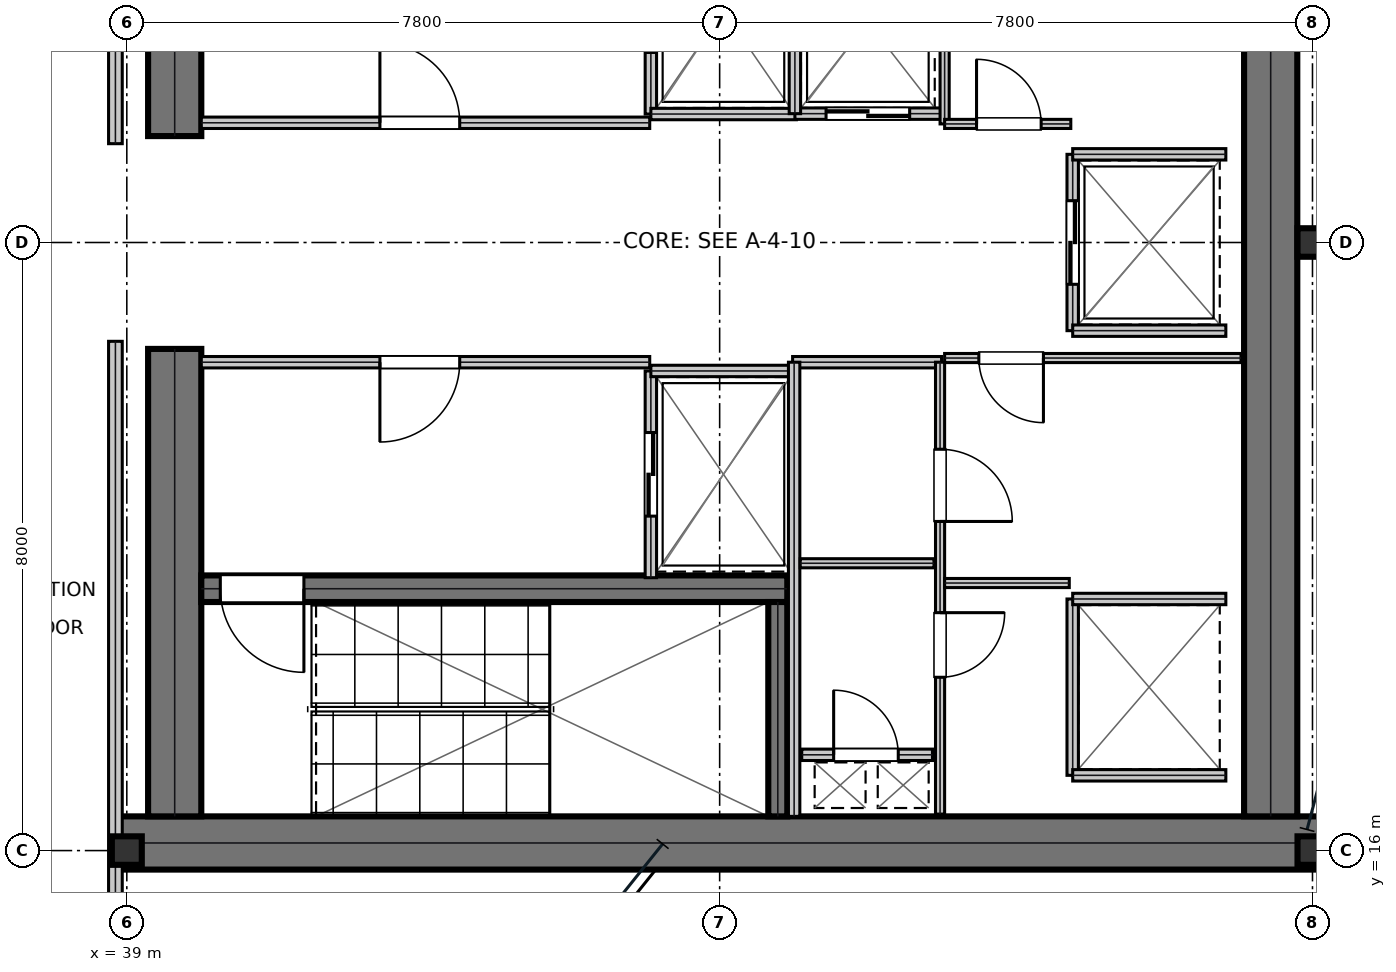
"""IFC4 building model, lengths in metres.
Left out: names, types, materials, properties, quantities, classifications, styles, units other than length and angle.
Written with IfcOpenShell. Run it as: python <this file> out.ifc"""

import sys

from ifc_helpers import new_model, si_unit, direction, frame, frame_2d, origin, origin_2d, place, context, subcontext, project, spatial, rectangle, i_section, extrude, element, fill, save


model = new_model("IFC4")
c1 = context("Model", 3, precision=1e-05, world=origin(), true_north=direction((0.0, 1.0)))
c2 = subcontext(c1, "Body", "Model", "MODEL_VIEW")
j1 = project(units=[si_unit("LENGTHUNIT", "METRE"), si_unit("PLANEANGLEUNIT", "RADIAN")], contexts=[c1])
p1 = place(None, origin())
s1 = spatial("IfcSite", under=j1, at=p1, CompositionType="ELEMENT")
p2 = place(p1, origin())
s2 = spatial("IfcBuilding", under=s1, at=p2, CompositionType="ELEMENT")
p3 = place(p2, frame((0.0, 0.0, 252.6)))
s3 = spatial("IfcBuildingStorey", under=s2, at=p3, CompositionType="ELEMENT", Elevation=252.6)
p4 = place(p3, frame((38.8, 16.1, 0.0), z_axis=(0.0, 0.0, 1.0), x_axis=(1.0, 0.0, 0.0)))
e1 = element("IfcWall", 1, at=p4, inside=s3, PredefinedType="SHEAR", context=c2, shape_type="SweptSolid", body=[
    extrude(rectangle(XDim=16.0, YDim=0.7, at=frame_2d((8.0, 0.0))), origin(), (0.0, 0.0, 1.0), 3.73),
])
for number, where, z_axis, x_axis in (
    (2, (39.63, 16.45, 0.0), (0.0, 0.0, 1.0), (0.0, 1.0, 0.0)),
    (3, (39.63, 25.4, 0.0), (0.0, 0.0, 1.0), (0.0, 1.0, 0.0)),
):
    element("IfcWall", number, at=place(p3, frame(where, z_axis=z_axis, x_axis=x_axis)), inside=s3, PredefinedType="SHEAR", context=c2, shape_type="SweptSolid", body=[
        extrude(rectangle(XDim=6.15, YDim=0.7, at=frame_2d((3.075, 0.0))), origin(), (0.0, 0.0, 1.0), 3.73),
    ])
p5 = place(p3, frame((54.05, 16.45, 0.0), z_axis=(0.0, 0.0, 1.0), x_axis=(0.0, 1.0, 0.0)))
e4 = element("IfcWall", 4, at=p5, inside=s3, PredefinedType="SHEAR", context=c2, shape_type="SweptSolid", body=[
    extrude(rectangle(XDim=15.1, YDim=0.7, at=frame_2d((7.55, 0.0))), origin(), (0.0, 0.0, 1.0), 3.73),
])
p6 = place(p3, frame((39.98, 19.445, 0.0), z_axis=(0.0, 0.0, 1.0), x_axis=(1.0, 0.0, 0.0)))
e5 = element("IfcWall", 5, at=p6, inside=s3, PredefinedType="SHEAR", context=c2, shape_type="SweptSolid", body=[
    extrude(rectangle(XDim=7.71, YDim=0.35, at=frame_2d((3.855, 0.0))), origin(), (0.0, 0.0, 1.0), 3.73),
])
p7 = place(p6, frame((0.25, 0.0, 0.0)))
e6 = element("IfcOpeningElement", 6, at=p7, cuts=e5, PredefinedType="OPENING", context=c2, shape_type="SweptSolid", body=[
    extrude(rectangle(XDim=1.1, YDim=2.15, at=frame_2d((0.55, 1.075))), frame((0.0, 0.185, 0.0), z_axis=(0.0, -1.0, 0.0), x_axis=(1.0, 0.0, 0.0)), (0.0, 0.0, 1.0), 0.37),
])
p8 = place(p3, frame((47.565, 16.45, 0.0), z_axis=(0.0, 0.0, 1.0), x_axis=(0.0, 1.0, 0.0)))
e7 = element("IfcWall", 7, at=p8, inside=s3, PredefinedType="SHEAR", context=c2, shape_type="SweptSolid", body=[
    extrude(rectangle(XDim=2.82, YDim=0.25, at=frame_2d((1.41, 0.0))), origin(), (0.0, 0.0, 1.0), 3.73),
])
for number, where, z_axis, x_axis in (
    (8, (39.0, 16.0, 0.0), (0.0, 0.0, 1.0), (1.0, 0.0, 0.0)),
    (9, (54.6, 16.0, 0.0), (0.0, 0.0, 1.0), (1.0, 0.0, 0.0)),
    (10, (54.6, 24.0, 0.0), (0.0, 0.0, 1.0), (1.0, 0.0, 0.0)),
):
    element("IfcColumn", number, at=place(p3, frame(where, z_axis=z_axis, x_axis=x_axis)), inside=s3, PredefinedType="COLUMN", context=c2, shape_type="SweptSolid", body=[
        extrude(i_section(OverallWidth=0.394, OverallDepth=0.375, WebThickness=0.017, FlangeThickness=0.028, at=origin_2d()), origin(), (0.0, 0.0, 1.0), 4.044),
    ])
p9 = place(p3, frame((39.98, 25.575, 0.0), z_axis=(0.0, 0.0, 1.0), x_axis=(1.0, 0.0, 0.0)))
e11 = element("IfcWall", 11, at=p9, inside=s3, PredefinedType="PARTITIONING", context=c2, shape_type="SweptSolid", body=[
    extrude(rectangle(XDim=5.9, YDim=0.15, at=frame_2d((2.95, 0.0))), origin(), (0.0, 0.0, 1.0), 3.73),
])
p10 = place(p9, frame((2.35, 0.0, 0.0)))
e12 = element("IfcOpeningElement", 12, at=p10, cuts=e11, PredefinedType="OPENING", context=c2, shape_type="SweptSolid", body=[
    extrude(rectangle(XDim=1.05, YDim=2.15, at=frame_2d((0.525, 1.075))), frame((0.0, 0.085, 0.0), z_axis=(0.0, -1.0, 0.0), x_axis=(1.0, 0.0, 0.0)), (0.0, 0.0, 1.0), 0.17),
])
p11 = place(p3, frame((39.98, 22.425, 0.0), z_axis=(0.0, 0.0, 1.0), x_axis=(1.0, 0.0, 0.0)))
e13 = element("IfcWall", 13, at=p11, inside=s3, PredefinedType="PARTITIONING", context=c2, shape_type="SweptSolid", body=[
    extrude(rectangle(XDim=5.9, YDim=0.15, at=frame_2d((2.95, 0.0))), origin(), (0.0, 0.0, 1.0), 3.73),
])
p12 = place(p11, frame((2.35, 0.0, 0.0)))
e14 = element("IfcOpeningElement", 14, at=p12, cuts=e13, PredefinedType="OPENING", context=c2, shape_type="SweptSolid", body=[
    extrude(rectangle(XDim=1.05, YDim=2.15, at=frame_2d((0.525, 1.075))), frame((0.0, 0.085, 0.0), z_axis=(0.0, -1.0, 0.0), x_axis=(1.0, 0.0, 0.0)), (0.0, 0.0, 1.0), 0.17),
])
p13 = place(p3, frame((45.895, 25.69, 0.0), z_axis=(0.0, 0.0, 1.0), x_axis=(0.0, 1.0, 0.0)))
e15 = element("IfcWall", 15, at=p13, inside=s3, PredefinedType="PARTITIONING", context=c2, shape_type="SweptSolid", body=[
    extrude(rectangle(XDim=2.72, YDim=0.15, at=frame_2d((1.36, 0.0))), origin(), (0.0, 0.0, 1.0), 3.73),
])
p14 = place(p13, frame((0.81, 0.0, 0.0)))
e16 = element("IfcOpeningElement", 16, at=p14, cuts=e15, PredefinedType="OPENING", context=c2, shape_type="SweptSolid", body=[
    extrude(rectangle(XDim=1.1, YDim=2.15, at=frame_2d((0.55, 1.075))), frame((0.0, 0.085, 0.0), z_axis=(0.0, -1.0, 0.0), x_axis=(1.0, 0.0, 0.0)), (0.0, 0.0, 1.0), 0.17),
])
p15 = place(p3, frame((45.895, 25.69, 0.0), z_axis=(0.0, 0.0, 1.0), x_axis=(1.0, 0.0, 0.0)))
e17 = element("IfcWall", 17, at=p15, inside=s3, PredefinedType="PARTITIONING", context=c2, shape_type="SweptSolid", body=[
    extrude(rectangle(XDim=1.915, YDim=0.15, at=frame_2d((0.958, 0.0))), origin(), (0.0, 0.0, 1.0), 3.73),
])
p16 = place(p3, frame((45.895, 19.59, 0.0), z_axis=(0.0, 0.0, 1.0), x_axis=(0.0, 1.0, 0.0)))
e18 = element("IfcWall", 18, at=p16, inside=s3, PredefinedType="PARTITIONING", context=c2, shape_type="SweptSolid", body=[
    extrude(rectangle(XDim=2.72, YDim=0.15, at=frame_2d((1.36, 0.0))), origin(), (0.0, 0.0, 1.0), 3.73),
])
p17 = place(p16, frame((0.81, 0.0, 0.0)))
e19 = element("IfcOpeningElement", 19, at=p17, cuts=e18, PredefinedType="OPENING", context=c2, shape_type="SweptSolid", body=[
    extrude(rectangle(XDim=1.1, YDim=2.15, at=frame_2d((0.55, 1.075))), frame((0.0, 0.085, 0.0), z_axis=(0.0, -1.0, 0.0), x_axis=(1.0, 0.0, 0.0)), (0.0, 0.0, 1.0), 0.17),
])
p18 = place(p3, frame((45.895, 22.31, 0.0), z_axis=(0.0, 0.0, 1.0), x_axis=(1.0, 0.0, 0.0)))
e20 = element("IfcWall", 20, at=p18, inside=s3, PredefinedType="PARTITIONING", context=c2, shape_type="SweptSolid", body=[
    extrude(rectangle(XDim=1.915, YDim=0.15, at=frame_2d((0.958, 0.0))), origin(), (0.0, 0.0, 1.0), 3.73),
])
p19 = place(p3, frame((47.79, 25.695, 0.0), z_axis=(0.0, 0.0, 1.0), x_axis=(1.0, 0.0, 0.0)))
e21 = element("IfcWall", 21, at=p19, inside=s3, PredefinedType="PARTITIONING", context=c2, shape_type="SweptSolid", body=[
    extrude(rectangle(XDim=1.92, YDim=0.15, at=frame_2d((0.96, 0.0))), origin(), (0.0, 0.0, 1.0), 3.73),
])
p20 = place(p19, frame((0.41, 0.0, 0.0)))
e22 = element("IfcOpeningElement", 22, at=p20, cuts=e21, PredefinedType="OPENING", context=c2, shape_type="SweptSolid", body=[
    extrude(rectangle(XDim=1.1, YDim=2.15, at=frame_2d((0.55, 1.075))), frame((0.0, 0.085, 0.0), z_axis=(0.0, -1.0, 0.0), x_axis=(1.0, 0.0, 0.0)), (0.0, 0.0, 1.0), 0.17),
])
p21 = place(p3, frame((47.79, 25.695, 0.0), z_axis=(0.0, 0.0, 1.0), x_axis=(0.0, 1.0, 0.0)))
e23 = element("IfcWall", 23, at=p21, inside=s3, PredefinedType="PARTITIONING", context=c2, shape_type="SweptSolid", body=[
    extrude(rectangle(XDim=2.415, YDim=0.15, at=frame_2d((1.208, 0.0))), origin(), (0.0, 0.0, 1.0), 3.73),
])
p22 = place(p3, frame((51.445, 22.84, 0.0), z_axis=(0.0, 0.0, 1.0), x_axis=(0.0, 1.0, 0.0)))
e24 = element("IfcWall", 24, at=p22, inside=s3, PredefinedType="PARTITIONING", context=c2, shape_type="SweptSolid", body=[
    extrude(rectangle(XDim=2.32, YDim=0.15, at=frame_2d((1.16, 0.0))), origin(), (0.0, 0.0, 1.0), 3.73),
])
p23 = place(p22, frame((0.61, 0.0, 0.0)))
e25 = element("IfcOpeningElement", 25, at=p23, cuts=e24, PredefinedType="OPENING", context=c2, shape_type="SweptSolid", body=[
    extrude(rectangle(XDim=1.1, YDim=2.15, at=frame_2d((0.55, 1.075))), frame((0.0, 0.085, 0.0), z_axis=(0.0, -1.0, 0.0), x_axis=(1.0, 0.0, 0.0)), (0.0, 0.0, 1.0), 0.17),
])
for number, where, z_axis, x_axis in (
    (26, (51.445, 22.84, 0.0), (0.0, 0.0, 1.0), (1.0, 0.0, 0.0)),
    (27, (51.445, 25.16, 0.0), (0.0, 0.0, 1.0), (1.0, 0.0, 0.0)),
):
    element("IfcWall", number, at=place(p3, frame(where, z_axis=z_axis, x_axis=x_axis)), inside=s3, PredefinedType="PARTITIONING", context=c2, shape_type="SweptSolid", body=[
        extrude(rectangle(XDim=2.015, YDim=0.15, at=frame_2d((1.007, 0.0))), origin(), (0.0, 0.0, 1.0), 3.73),
    ])
p24 = place(p3, frame((51.445, 16.99, 0.0), z_axis=(0.0, 0.0, 1.0), x_axis=(0.0, 1.0, 0.0)))
e28 = element("IfcWall", 28, at=p24, inside=s3, PredefinedType="PARTITIONING", context=c2, shape_type="SweptSolid", body=[
    extrude(rectangle(XDim=2.32, YDim=0.15, at=frame_2d((1.16, 0.0))), origin(), (0.0, 0.0, 1.0), 3.73),
])
for number, where, z_axis, x_axis in (
    (29, (51.445, 16.99, 0.0), (0.0, 0.0, 1.0), (1.0, 0.0, 0.0)),
    (30, (51.445, 19.31, 0.0), (0.0, 0.0, 1.0), (1.0, 0.0, 0.0)),
):
    element("IfcWall", number, at=place(p3, frame(where, z_axis=z_axis, x_axis=x_axis)), inside=s3, PredefinedType="PARTITIONING", context=c2, shape_type="SweptSolid", body=[
        extrude(rectangle(XDim=2.015, YDim=0.15, at=frame_2d((1.007, 0.0))), origin(), (0.0, 0.0, 1.0), 3.73),
    ])
p25 = place(p3, frame((47.88, 17.26, 0.0), z_axis=(0.0, 0.0, 1.0), x_axis=(1.0, 0.0, 0.0)))
e31 = element("IfcWall", 31, at=p25, inside=s3, PredefinedType="PARTITIONING", context=c2, shape_type="SweptSolid", body=[
    extrude(rectangle(XDim=1.72, YDim=0.15, at=frame_2d((0.86, 0.0))), origin(), (0.0, 0.0, 1.0), 3.73),
])
p26 = place(p25, frame((0.42, 0.0, 0.0)))
e32 = element("IfcOpeningElement", 32, at=p26, cuts=e31, PredefinedType="OPENING", context=c2, shape_type="SweptSolid", body=[
    extrude(rectangle(XDim=0.85, YDim=2.15, at=frame_2d((0.425, 1.075))), frame((0.0, 0.085, 0.0), z_axis=(0.0, -1.0, 0.0), x_axis=(1.0, 0.0, 0.0)), (0.0, 0.0, 1.0), 0.17),
])
p27 = place(p3, frame((47.76, 22.425, 0.0), z_axis=(0.0, 0.0, 1.0), x_axis=(1.0, 0.0, 0.0)))
e33 = element("IfcWall", 33, at=p27, inside=s3, PredefinedType="PARTITIONING", context=c2, shape_type="SweptSolid", body=[
    extrude(rectangle(XDim=1.96, YDim=0.15, at=frame_2d((0.98, 0.0))), origin(), (0.0, 0.0, 1.0), 3.73),
])
p28 = place(p3, frame((47.78, 16.45, 0.0), z_axis=(0.0, 0.0, 1.0), x_axis=(0.0, 1.0, 0.0)))
e34 = element("IfcWall", 34, at=p28, inside=s3, PredefinedType="PARTITIONING", context=c2, shape_type="SweptSolid", body=[
    extrude(rectangle(XDim=5.975, YDim=0.15, at=frame_2d((2.988, 0.0))), origin(), (0.0, 0.0, 1.0), 3.73),
])
p29 = place(p3, frame((47.86, 19.78, 0.0), z_axis=(0.0, 0.0, 1.0), x_axis=(1.0, 0.0, 0.0)))
e35 = element("IfcWall", 35, at=p29, inside=s3, PredefinedType="PARTITIONING", context=c2, shape_type="SweptSolid", body=[
    extrude(rectangle(XDim=1.76, YDim=0.12, at=frame_2d((0.88, 0.0))), origin(), (0.0, 0.0, 1.0), 3.73),
])
p30 = place(p3, frame((49.7, 16.48, 0.0), z_axis=(0.0, 0.0, 1.0), x_axis=(0.0, 1.0, 0.0)))
e36 = element("IfcWall", 36, at=p30, inside=s3, PredefinedType="PARTITIONING", context=c2, shape_type="SweptSolid", body=[
    extrude(rectangle(XDim=5.945, YDim=0.12, at=frame_2d((2.973, 0.0))), origin(), (0.0, 0.0, 1.0), 3.73),
])
p31 = place(p30, frame((1.8, 0.0, 0.0)))
e37 = element("IfcOpeningElement", 37, at=p31, cuts=e36, PredefinedType="OPENING", context=c2, shape_type="SweptSolid", body=[
    extrude(rectangle(XDim=0.85, YDim=2.15, at=frame_2d((0.425, 1.075))), frame((0.0, 0.07, 0.0), z_axis=(0.0, -1.0, 0.0), x_axis=(1.0, 0.0, 0.0)), (0.0, 0.0, 1.0), 0.14),
])
p32 = place(p30, frame((3.85, 0.0, 0.0)))
e38 = element("IfcOpeningElement", 38, at=p32, cuts=e36, PredefinedType="OPENING", context=c2, shape_type="SweptSolid", body=[
    extrude(rectangle(XDim=0.95, YDim=2.15, at=frame_2d((0.475, 1.075))), frame((0.0, 0.07, 0.0), z_axis=(0.0, -1.0, 0.0), x_axis=(1.0, 0.0, 0.0)), (0.0, 0.0, 1.0), 0.14),
])
p33 = place(p3, frame((49.76, 22.48, 0.0), z_axis=(0.0, 0.0, 1.0), x_axis=(1.0, 0.0, 0.0)))
e39 = element("IfcWall", 39, at=p33, inside=s3, PredefinedType="PARTITIONING", context=c2, shape_type="SweptSolid", body=[
    extrude(rectangle(XDim=3.9, YDim=0.12, at=frame_2d((1.95, 0.0))), origin(), (0.0, 0.0, 1.0), 3.73),
])
p34 = place(p33, frame((0.45, 0.0, 0.0)))
e40 = element("IfcOpeningElement", 40, at=p34, cuts=e39, PredefinedType="OPENING", context=c2, shape_type="SweptSolid", body=[
    extrude(rectangle(XDim=0.85, YDim=2.15, at=frame_2d((0.425, 1.075))), frame((0.0, 0.07, 0.0), z_axis=(0.0, -1.0, 0.0), x_axis=(1.0, 0.0, 0.0)), (0.0, 0.0, 1.0), 0.14),
])
p35 = place(p3, frame((49.76, 19.52, 0.0), z_axis=(0.0, 0.0, 1.0), x_axis=(1.0, 0.0, 0.0)))
e41 = element("IfcWall", 41, at=p35, inside=s3, PredefinedType="PARTITIONING", context=c2, shape_type="SweptSolid", body=[
    extrude(rectangle(XDim=1.64, YDim=0.12, at=frame_2d((0.82, 0.0))), origin(), (0.0, 0.0, 1.0), 3.73),
])
p36 = place(p3, frame((49.76, 25.56, 0.0), z_axis=(0.0, 0.0, 1.0), x_axis=(0.0, 1.0, 0.0)))
e42 = element("IfcWall", 42, at=p36, inside=s3, PredefinedType="PARTITIONING", context=c2, shape_type="SweptSolid", body=[
    extrude(rectangle(XDim=2.66, YDim=0.12, at=frame_2d((1.33, 0.0))), origin(), (0.0, 0.0, 1.0), 3.73),
])
p37 = place(p3, frame((49.76, 25.56, 0.0), z_axis=(0.0, 0.0, 1.0), x_axis=(1.0, 0.0, 0.0)))
e43 = element("IfcWall", 43, at=p37, inside=s3, PredefinedType="PARTITIONING", context=c2, shape_type="SweptSolid", body=[
    extrude(rectangle(XDim=1.66, YDim=0.12, at=frame_2d((0.83, 0.0))), origin(), (0.0, 0.0, 1.0), 3.73),
])
p38 = place(p37, frame((0.42, 0.0, 0.0)))
e44 = element("IfcOpeningElement", 44, at=p38, cuts=e43, PredefinedType="OPENING", context=c2, shape_type="SweptSolid", body=[
    extrude(rectangle(XDim=0.85, YDim=2.15, at=frame_2d((0.425, 1.075))), frame((0.0, 0.07, 0.0), z_axis=(0.0, -1.0, 0.0), x_axis=(1.0, 0.0, 0.0)), (0.0, 0.0, 1.0), 0.14),
])
for number, where, z_axis, x_axis in (
    (45, (38.85, 14.5, 0.0), (0.0, 0.0, 1.0), (0.0, 1.0, 0.0)),
    (46, (38.85, 25.3, 0.0), (0.0, 0.0, 1.0), (0.0, 1.0, 0.0)),
):
    element("IfcWall", number, at=place(p3, frame(where, z_axis=z_axis, x_axis=x_axis)), inside=s3, PredefinedType="SOLIDWALL", context=c2, shape_type="SweptSolid", body=[
        extrude(rectangle(XDim=8.2, YDim=0.18, at=frame_2d((4.1, 0.0))), origin(), (0.0, 0.0, 1.0), 3.181),
    ])
p39 = place(p10, origin())
e47 = element("IfcDoor", 47, at=p39, inside=s3, OperationType="SINGLE_SWING_LEFT", PredefinedType="DOOR", context=c2, shape_type="SweptSolid", body=[
    extrude(rectangle(XDim=1.05, YDim=2.15, at=frame_2d((0.525, 1.075))), frame((0.0, 0.025, 0.0), z_axis=(0.0, -1.0, 0.0), x_axis=(1.0, 0.0, 0.0)), (0.0, 0.0, 1.0), 0.05),
])
fill(e12, e47)
p40 = place(p12, frame((1.05, 0.0, 0.0), z_axis=(0.0, 0.0, 1.0), x_axis=(-1.0, 0.0, 0.0)))
e48 = element("IfcDoor", 48, at=p40, inside=s3, OperationType="SINGLE_SWING_RIGHT", PredefinedType="DOOR", context=c2, shape_type="SweptSolid", body=[
    extrude(rectangle(XDim=1.05, YDim=2.15, at=frame_2d((0.525, 1.075))), frame((0.0, 0.025, 0.0), z_axis=(0.0, -1.0, 0.0), x_axis=(1.0, 0.0, 0.0)), (0.0, 0.0, 1.0), 0.05),
])
fill(e14, e48)
p41 = place(p17, frame((1.1, 0.0, 0.0), z_axis=(0.0, 0.0, 1.0), x_axis=(-1.0, 0.0, 0.0)))
e49 = element("IfcDoor", 49, at=p41, inside=s3, OperationType="DOUBLE_DOOR_SLIDING", PredefinedType="DOOR", context=c2, shape_type="SweptSolid", body=[
    extrude(rectangle(XDim=1.1, YDim=2.15, at=frame_2d((0.55, 1.075))), frame((0.0, 0.025, 0.0), z_axis=(0.0, -1.0, 0.0), x_axis=(1.0, 0.0, 0.0)), (0.0, 0.0, 1.0), 0.05),
])
fill(e19, e49)
p42 = place(p20, frame((1.1, 0.0, 0.0), z_axis=(0.0, 0.0, 1.0), x_axis=(-1.0, 0.0, 0.0)))
e50 = element("IfcDoor", 50, at=p42, inside=s3, OperationType="DOUBLE_DOOR_SLIDING", PredefinedType="DOOR", context=c2, shape_type="SweptSolid", body=[
    extrude(rectangle(XDim=1.1, YDim=2.15, at=frame_2d((0.55, 1.075))), frame((0.0, 0.025, 0.0), z_axis=(0.0, -1.0, 0.0), x_axis=(1.0, 0.0, 0.0)), (0.0, 0.0, 1.0), 0.05),
])
fill(e22, e50)
p43 = place(p23, frame((1.1, 0.0, 0.0), z_axis=(0.0, 0.0, 1.0), x_axis=(-1.0, 0.0, 0.0)))
e51 = element("IfcDoor", 51, at=p43, inside=s3, OperationType="DOUBLE_DOOR_SLIDING", PredefinedType="DOOR", context=c2, shape_type="SweptSolid", body=[
    extrude(rectangle(XDim=1.1, YDim=2.15, at=frame_2d((0.55, 1.075))), frame((0.0, 0.025, 0.0), z_axis=(0.0, -1.0, 0.0), x_axis=(1.0, 0.0, 0.0)), (0.0, 0.0, 1.0), 0.05),
])
fill(e25, e51)
p44 = place(p26, origin())
e52 = element("IfcDoor", 52, at=p44, inside=s3, OperationType="SINGLE_SWING_LEFT", PredefinedType="TRAPDOOR", context=c2, shape_type="SweptSolid", body=[
    extrude(rectangle(XDim=0.85, YDim=2.15, at=frame_2d((0.425, 1.075))), frame((0.0, 0.025, 0.0), z_axis=(0.0, -1.0, 0.0), x_axis=(1.0, 0.0, 0.0)), (0.0, 0.0, 1.0), 0.05),
])
fill(e32, e52)
p45 = place(p31, frame((0.85, 0.0, 0.0), z_axis=(0.0, 0.0, 1.0), x_axis=(-1.0, 0.0, 0.0)))
e53 = element("IfcDoor", 53, at=p45, inside=s3, OperationType="SINGLE_SWING_LEFT", PredefinedType="DOOR", context=c2, shape_type="SweptSolid", body=[
    extrude(rectangle(XDim=0.85, YDim=2.15, at=frame_2d((0.425, 1.075))), frame((0.0, 0.025, 0.0), z_axis=(0.0, -1.0, 0.0), x_axis=(1.0, 0.0, 0.0)), (0.0, 0.0, 1.0), 0.05),
])
fill(e37, e53)
p46 = place(p32, frame((0.95, 0.0, 0.0), z_axis=(0.0, 0.0, 1.0), x_axis=(-1.0, 0.0, 0.0)))
e54 = element("IfcDoor", 54, at=p46, inside=s3, OperationType="SINGLE_SWING_RIGHT", PredefinedType="DOOR", context=c2, shape_type="SweptSolid", body=[
    extrude(rectangle(XDim=0.95, YDim=2.15, at=frame_2d((0.475, 1.075))), frame((0.0, 0.025, 0.0), z_axis=(0.0, -1.0, 0.0), x_axis=(1.0, 0.0, 0.0)), (0.0, 0.0, 1.0), 0.05),
])
fill(e38, e54)
p47 = place(p34, frame((0.85, 0.0, 0.0), z_axis=(0.0, 0.0, 1.0), x_axis=(-1.0, 0.0, 0.0)))
e55 = element("IfcDoor", 55, at=p47, inside=s3, OperationType="SINGLE_SWING_LEFT", PredefinedType="DOOR", context=c2, shape_type="SweptSolid", body=[
    extrude(rectangle(XDim=0.85, YDim=2.15, at=frame_2d((0.425, 1.075))), frame((0.0, 0.025, 0.0), z_axis=(0.0, -1.0, 0.0), x_axis=(1.0, 0.0, 0.0)), (0.0, 0.0, 1.0), 0.05),
])
fill(e40, e55)
p48 = place(p38, origin())
e56 = element("IfcDoor", 56, at=p48, inside=s3, OperationType="SINGLE_SWING_LEFT", PredefinedType="DOOR", context=c2, shape_type="SweptSolid", body=[
    extrude(rectangle(XDim=0.85, YDim=2.15, at=frame_2d((0.425, 1.075))), frame((0.0, 0.025, 0.0), z_axis=(0.0, -1.0, 0.0), x_axis=(1.0, 0.0, 0.0)), (0.0, 0.0, 1.0), 0.05),
])
fill(e44, e56)
p49 = place(p7, frame((1.1, 0.0, 0.0), z_axis=(0.0, 0.0, 1.0), x_axis=(-1.0, 0.0, 0.0)))
e57 = element("IfcDoor", 57, at=p49, inside=s3, OperationType="SINGLE_SWING_LEFT", PredefinedType="DOOR", context=c2, shape_type="SweptSolid", body=[
    extrude(rectangle(XDim=1.1, YDim=2.15, at=frame_2d((0.55, 1.075))), frame((0.0, 0.025, 0.0), z_axis=(0.0, -1.0, 0.0), x_axis=(1.0, 0.0, 0.0)), (0.0, 0.0, 1.0), 0.05),
])
fill(e6, e57)
save(model, sys.argv[1])
